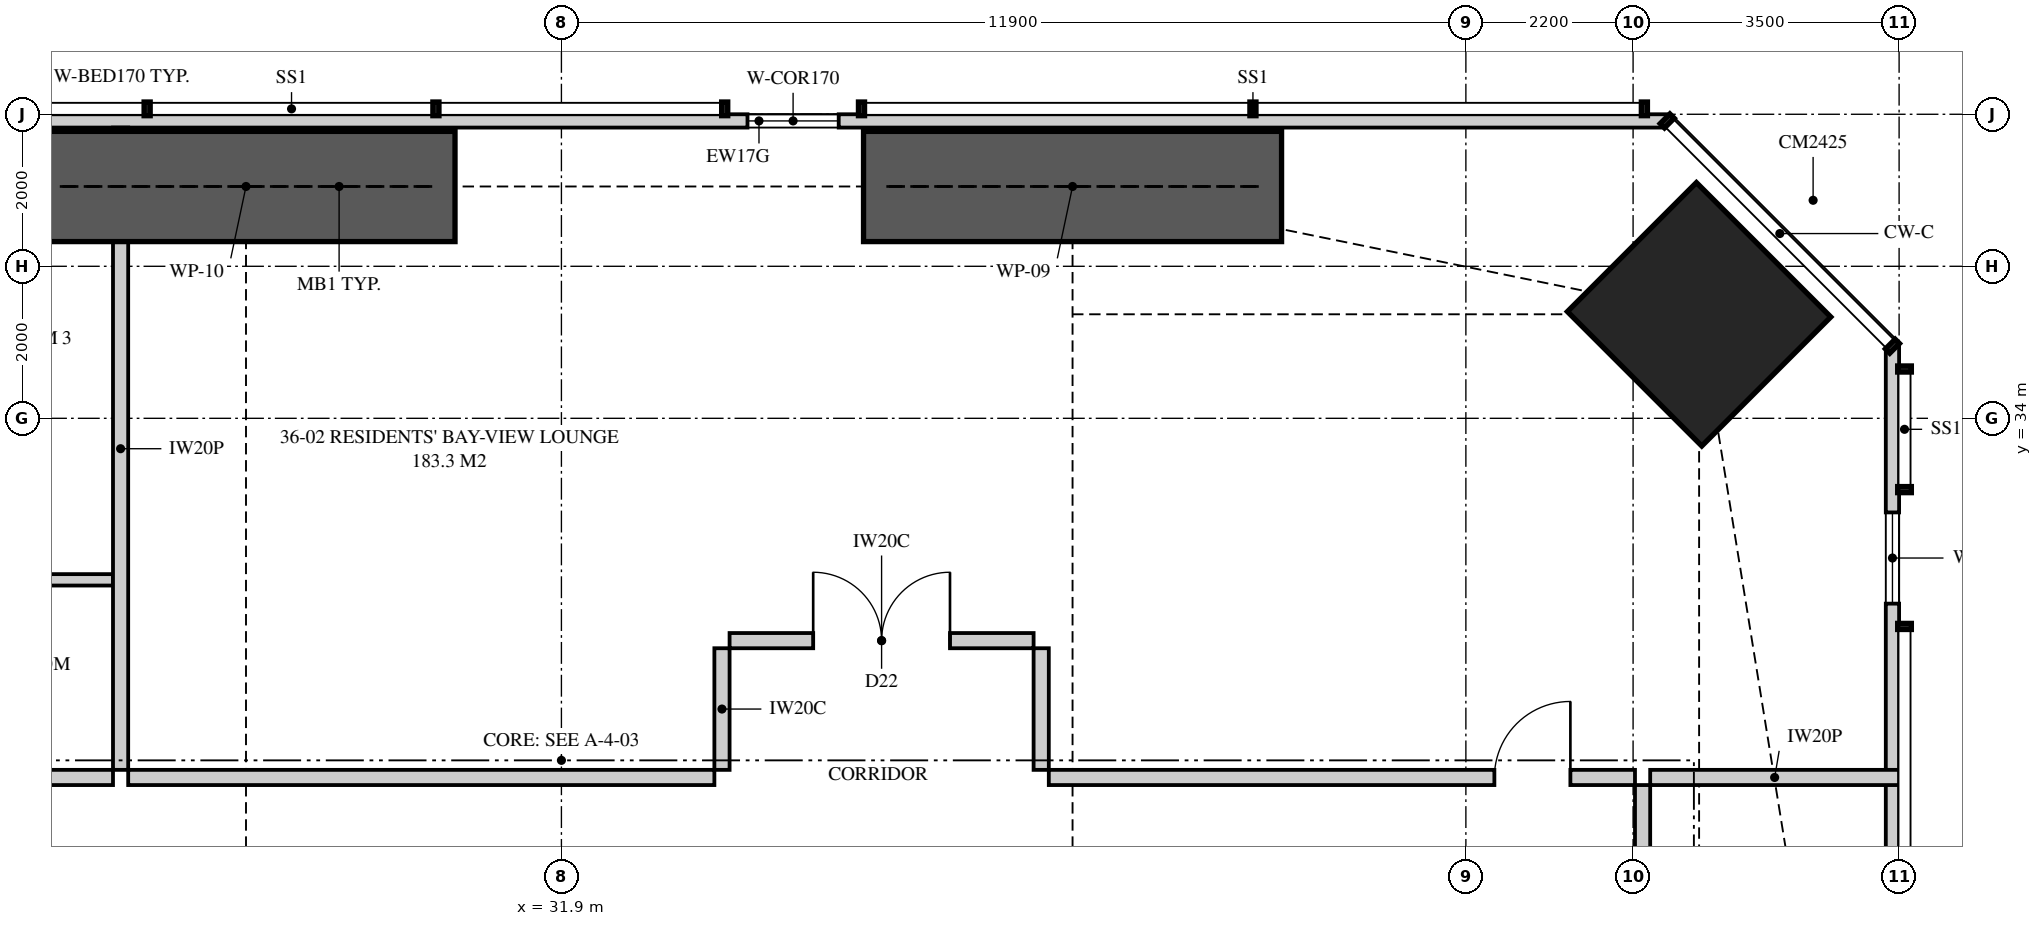
"""IFC4 building model, lengths in metres.
Left out: names, types, materials, properties, quantities, classifications, styles, units other than length and angle.
Written with IfcOpenShell. Run it as: python <this file> out.ifc"""

import sys

from ifc_helpers import new_model, si_unit, direction, frame, frame_2d, origin, origin_2d, place, context, subcontext, project, spatial, polyline, rectangle, outline, extrude, element, fill, save


model = new_model("IFC4")
c1 = context("Model", 3, precision=1e-05, world=origin(), true_north=direction((0.0, 1.0)))
c2 = subcontext(c1, "Body", "Model", "MODEL_VIEW")
j1 = project(units=[si_unit("LENGTHUNIT", "METRE"), si_unit("PLANEANGLEUNIT", "RADIAN")], contexts=[c1])
p1 = place(None, origin())
s1 = spatial("IfcSite", under=j1, at=p1, CompositionType="ELEMENT")
p2 = place(p1, origin())
s2 = spatial("IfcBuilding", under=s1, at=p2, CompositionType="ELEMENT")
p3 = place(p2, frame((0.0, 0.0, 131.65)))
s3 = spatial("IfcBuildingStorey", under=s2, at=p3, CompositionType="ELEMENT", Elevation=131.65)
p4 = place(p3, frame((46.869, 35.369, 0.0), z_axis=(0.0, 0.0, 1.0), x_axis=(-0.707106781187, -0.707106781187, 0.0)))
e1 = element("IfcColumn", 1, at=p4, inside=s3, PredefinedType="COLUMN", context=c2, shape_type="SweptSolid", body=[
    extrude(rectangle(XDim=2.4, YDim=2.5, at=origin_2d()), origin(), (0.0, 0.0, 1.0), 3.35),
])
p5 = place(p3, frame((49.413, 3.051, 0.0), z_axis=(0.0, 0.0, 1.0), x_axis=(0.0, 1.0, 0.0)))
e2 = element("IfcWall", 2, at=p5, inside=s3, PredefinedType="SOLIDWALL", context=c2, shape_type="SweptSolid", body=[
    extrude(outline(polyline([(0.0, 0.0), (31.897, 0.0), (31.897, 3.11), (22.167, 3.11), (22.167, 2.15), (22.074, 2.15), (22.074, 3.11), (21.949, 3.11), (21.949, 2.15), (9.949, 2.15), (9.949, 3.11), (9.823, 3.11), (9.823, 2.15), (9.73, 2.15), (9.73, 3.11), (0.0, 3.11), (0.0, 0.0)])), frame((0.0, 0.087, 0.0), z_axis=(0.0, -1.0, 0.0), x_axis=(1.0, 0.0, 0.0)), (0.0, 0.0, 1.0), 0.175),
])
p6 = place(p5, frame((2.118, 0.0, 0.4)))
e3 = element("IfcOpeningElement", 3, at=p6, cuts=e2, PredefinedType="OPENING", context=c2, shape_type="SweptSolid", body=[
    extrude(rectangle(XDim=1.8, YDim=1.7, at=frame_2d((0.9, 0.85))), frame((0.0, 0.097, 0.0), z_axis=(0.0, -1.0, 0.0), x_axis=(1.0, 0.0, 0.0)), (0.0, 0.0, 1.0), 0.195),
])
p7 = place(p5, frame((14.849, 0.0, 0.4)))
e4 = element("IfcOpeningElement", 4, at=p7, cuts=e2, PredefinedType="OPENING", context=c2, shape_type="SweptSolid", body=[
    extrude(rectangle(XDim=1.2, YDim=1.7, at=frame_2d((0.6, 0.85))), frame((0.0, 0.097, 0.0), z_axis=(0.0, -1.0, 0.0), x_axis=(1.0, 0.0, 0.0)), (0.0, 0.0, 1.0), 0.195),
])
p8 = place(p5, frame((28.51, 0.0, 0.4)))
e5 = element("IfcOpeningElement", 5, at=p8, cuts=e2, PredefinedType="OPENING", context=c2, shape_type="SweptSolid", body=[
    extrude(rectangle(XDim=1.2, YDim=1.7, at=frame_2d((0.6, 0.85))), frame((0.0, 0.097, 0.0), z_axis=(0.0, -1.0, 0.0), x_axis=(1.0, 0.0, 0.0)), (0.0, 0.0, 1.0), 0.195),
])
p9 = place(p3, frame((46.449, 37.913, 0.0), z_axis=(0.0, 0.0, 1.0), x_axis=(-1.0, 0.0, 0.0)))
e6 = element("IfcWall", 6, at=p9, inside=s3, PredefinedType="SOLIDWALL", context=c2, shape_type="SweptSolid", body=[
    extrude(outline(polyline([(0.0, 0.0), (23.899, 0.0), (23.899, 2.15), (7.824, 2.15), (7.824, 3.11), (7.666, 3.11), (7.666, 2.15), (7.62, 2.15), (7.62, 3.11), (0.0, 3.11), (0.0, 0.0)])), frame((0.0, 0.087, 0.0), z_axis=(0.0, -1.0, 0.0), x_axis=(1.0, 0.0, 0.0)), (0.0, 0.0, 1.0), 0.175),
])
p10 = place(p9, frame((10.9, 0.0, 0.4)))
e7 = element("IfcOpeningElement", 7, at=p10, cuts=e6, PredefinedType="OPENING", context=c2, shape_type="SweptSolid", body=[
    extrude(rectangle(XDim=1.2, YDim=1.7, at=frame_2d((0.6, 0.85))), frame((0.0, 0.097, 0.0), z_axis=(0.0, -1.0, 0.0), x_axis=(1.0, 0.0, 0.0)), (0.0, 0.0, 1.0), 0.195),
])
p11 = place(p9, frame((21.559, 0.0, 0.4)))
e8 = element("IfcOpeningElement", 8, at=p11, cuts=e6, PredefinedType="OPENING", context=c2, shape_type="SweptSolid", body=[
    extrude(rectangle(XDim=1.8, YDim=1.7, at=frame_2d((0.9, 0.85))), frame((0.0, 0.097, 0.0), z_axis=(0.0, -1.0, 0.0), x_axis=(1.0, 0.0, 0.0)), (0.0, 0.0, 1.0), 0.195),
])
p12 = place(p3, frame((26.1, 37.825, 0.0), z_axis=(0.0, 0.0, 1.0), x_axis=(0.0, -1.0, 0.0)))
e9 = element("IfcWall", 9, at=p12, inside=s3, PredefinedType="PARTITIONING", context=c2, shape_type="SweptSolid", body=[
    extrude(outline(polyline([(0.529, 2.15), (0.0, 2.15), (0.0, 0.0), (0.529, 0.0), (0.529, 0.376), (1.021, 0.376), (1.021, 0.0), (8.45, 0.0), (8.45, 3.11), (1.685, 3.11), (1.685, 2.15), (1.021, 2.15), (1.021, 1.774), (0.529, 1.774), (0.529, 2.15)])), frame((0.0, 0.1, 0.0), z_axis=(0.0, -1.0, 0.0), x_axis=(1.0, 0.0, 0.0)), (0.0, 0.0, 1.0), 0.2),
])
p13 = place(p3, frame((17.775, 29.275, 0.0), z_axis=(0.0, 0.0, 1.0), x_axis=(1.0, 0.0, 0.0)))
e10 = element("IfcWall", 10, at=p13, inside=s3, PredefinedType="PARTITIONING", context=c2, shape_type="SweptSolid", body=[
    extrude(rectangle(XDim=8.225, YDim=0.2, at=frame_2d((4.113, 0.0))), origin(), (0.0, 0.0, 1.0), 3.11),
])
p14 = place(p13, frame((0.2, 0.0, 0.0)))
e11 = element("IfcOpeningElement", 11, at=p14, cuts=e10, PredefinedType="OPENING", context=c2, shape_type="SweptSolid", body=[
    extrude(rectangle(XDim=1.05, YDim=2.2, at=frame_2d((0.525, 1.1))), frame((0.0, 0.11, 0.0), z_axis=(0.0, -1.0, 0.0), x_axis=(1.0, 0.0, 0.0)), (0.0, 0.0, 1.0), 0.22),
])
p15 = place(p3, frame((22.65, 31.875, 0.0), z_axis=(0.0, 0.0, 1.0), x_axis=(1.0, 0.0, 0.0)))
e12 = element("IfcWall", 12, at=p15, inside=s3, PredefinedType="PLUMBINGWALL", context=c2, shape_type="SweptSolid", body=[
    extrude(rectangle(XDim=3.35, YDim=0.15, at=frame_2d((1.675, 0.0))), origin(), (0.0, 0.0, 1.0), 3.11),
])
p16 = place(p3, frame((26.2, 29.275, 0.0), z_axis=(0.0, 0.0, 1.0), x_axis=(1.0, 0.0, 0.0)))
e13 = element("IfcWall", 13, at=p16, inside=s3, PredefinedType="PARTITIONING", context=c2, shape_type="SweptSolid", body=[
    extrude(outline(polyline([(0.0, 0.0), (7.713, 0.0), (7.712, 3.11), (1.887, 3.11), (1.887, 2.541), (1.213, 2.541), (1.213, 3.11), (0.0, 3.11), (0.0, 0.0)])), frame((0.0, 0.1, 0.0), z_axis=(0.0, -1.0, 0.0), x_axis=(1.0, 0.0, 0.0)), (0.0, 0.0, 1.0), 0.2),
])
p17 = place(p3, frame((46.225, 29.275, 0.0), z_axis=(0.0, 0.0, 1.0), x_axis=(1.0, 0.0, 0.0)))
e14 = element("IfcWall", 14, at=p17, inside=s3, PredefinedType="PARTITIONING", context=c2, shape_type="SweptSolid", body=[
    extrude(outline(polyline([(0.0, 0.0), (3.275, 0.0), (3.275, 3.11), (2.554, 3.11), (2.554, 2.15), (0.805, 2.15), (0.805, 2.541), (0.306, 2.541), (0.306, 3.11), (0.0, 3.11), (0.0, 0.0)])), frame((0.0, 0.1, 0.0), z_axis=(0.0, -1.0, 0.0), x_axis=(1.0, 0.0, 0.0)), (0.0, 0.0, 1.0), 0.2),
])
p18 = place(p3, frame((46.125, 7.825, 0.0), z_axis=(0.0, 0.0, 1.0), x_axis=(0.0, 1.0, 0.0)))
e15 = element("IfcWall", 15, at=p18, inside=s3, PredefinedType="PARTITIONING", context=c2, shape_type="SweptSolid", body=[
    extrude(outline(polyline([(0.0, 0.0), (21.35, 0.0), (21.35, 3.11), (17.512, 3.11), (17.512, 2.541), (16.838, 2.541), (16.838, 3.11), (5.512, 3.11), (5.512, 2.541), (4.838, 2.541), (4.838, 3.11), (0.0, 3.11), (0.0, 0.0)])), frame((0.0, 0.1, 0.0), z_axis=(0.0, -1.0, 0.0), x_axis=(1.0, 0.0, 0.0)), (0.0, 0.0, 1.0), 0.2),
])
p19 = place(p18, frame((9.775, 0.0, 0.0)))
e16 = element("IfcOpeningElement", 16, at=p19, cuts=e15, PredefinedType="OPENING", context=c2, shape_type="SweptSolid", body=[
    extrude(rectangle(XDim=1.8, YDim=2.1, at=frame_2d((0.9, 1.05))), frame((0.0, 0.11, 0.0), z_axis=(0.0, -1.0, 0.0), x_axis=(1.0, 0.0, 0.0)), (0.0, 0.0, 1.0), 0.22),
])
p20 = place(p18, frame((19.5, 0.0, 0.0)))
e17 = element("IfcOpeningElement", 17, at=p20, cuts=e15, PredefinedType="OPENING", context=c2, shape_type="SweptSolid", body=[
    extrude(rectangle(XDim=1.0, YDim=2.1, at=frame_2d((0.5, 1.05))), frame((0.0, 0.11, 0.0), z_axis=(0.0, -1.0, 0.0), x_axis=(1.0, 0.0, 0.0)), (0.0, 0.0, 1.0), 0.22),
])
p21 = place(p3, frame((38.312, 29.275, 0.0), z_axis=(0.0, 0.0, 1.0), x_axis=(1.0, 0.0, 0.0)))
e18 = element("IfcWall", 18, at=p21, inside=s3, PredefinedType="PARTITIONING", context=c2, shape_type="SweptSolid", body=[
    extrude(outline(polyline([(0.0, 0.0), (7.712, 0.0), (7.712, 3.11), (0.65, 3.11), (0.65, 2.541), (0.0, 2.541), (0.0, 3.11), (0.0, 0.0)])), frame((0.0, 0.1, 0.0), z_axis=(0.0, -1.0, 0.0), x_axis=(1.0, 0.0, 0.0)), (0.0, 0.0, 1.0), 0.2),
])
p22 = place(p21, frame((5.863, 0.0, 0.0)))
e19 = element("IfcOpeningElement", 19, at=p22, cuts=e18, PredefinedType="OPENING", context=c2, shape_type="SweptSolid", body=[
    extrude(rectangle(XDim=1.0, YDim=2.1, at=frame_2d((0.5, 1.05))), frame((0.0, 0.11, 0.0), z_axis=(0.0, -1.0, 0.0), x_axis=(1.0, 0.0, 0.0)), (0.0, 0.0, 1.0), 0.22),
])
p23 = place(p3, frame((34.113, 31.075, 0.0), z_axis=(0.0, 0.0, 1.0), x_axis=(1.0, 0.0, 0.0)))
e20 = element("IfcWall", 20, at=p23, inside=s3, PredefinedType="PARTITIONING", context=c2, shape_type="SweptSolid", body=[
    extrude(rectangle(XDim=4.0, YDim=0.2, at=frame_2d((2.0, 0.0))), origin(), (0.0, 0.0, 1.0), 3.11),
])
p24 = place(p23, frame((1.1, 0.0, 0.0)))
e21 = element("IfcOpeningElement", 21, at=p24, cuts=e20, PredefinedType="OPENING", context=c2, shape_type="SweptSolid", body=[
    extrude(rectangle(XDim=1.8, YDim=2.1, at=frame_2d((0.9, 1.05))), frame((0.0, 0.11, 0.0), z_axis=(0.0, -1.0, 0.0), x_axis=(1.0, 0.0, 0.0)), (0.0, 0.0, 1.0), 0.22),
])
for number, where, z_axis, x_axis in (
    (22, (34.012, 29.375, 0.0), (0.0, 0.0, 1.0), (0.0, 1.0, 0.0)),
    (23, (38.212, 29.375, 0.0), (0.0, 0.0, 1.0), (0.0, 1.0, 0.0)),
):
    element("IfcWall", number, at=place(p3, frame(where, z_axis=z_axis, x_axis=x_axis)), inside=s3, PredefinedType="PARTITIONING", context=c2, shape_type="SweptSolid", body=[
        extrude(rectangle(XDim=1.6, YDim=0.2, at=frame_2d((0.8, 0.0))), origin(), (0.0, 0.0, 1.0), 3.11),
    ])
for number, where, z_axis, x_axis in (
    (24, (35.875, 37.05, 0.0), (0.0, 0.0, 1.0), (1.0, 0.0, 0.0)),
    (25, (25.0, 37.05, 0.0), (0.0, 0.0, 1.0), (1.0, 0.0, 0.0)),
):
    element("IfcWall", number, at=place(p3, frame(where, z_axis=z_axis, x_axis=x_axis)), inside=s3, PredefinedType="SHEAR", context=c2, shape_type="SweptSolid", body=[
        extrude(rectangle(XDim=5.5, YDim=1.45, at=frame_2d((2.75, 0.0))), origin(), (0.0, 0.0, 1.0), 3.35),
    ])
p25 = place(p8, origin())
e26 = element("IfcWindow", 26, at=p25, inside=s3, PartitioningType="SINGLE_PANEL", PredefinedType="WINDOW", context=c2, shape_type="SweptSolid", body=[
    extrude(rectangle(XDim=1.2, YDim=1.7, at=frame_2d((0.6, 0.85))), frame((0.0, 0.03, 0.0), z_axis=(0.0, -1.0, 0.0), x_axis=(1.0, 0.0, 0.0)), (0.0, 0.0, 1.0), 0.06),
])
fill(e5, e26)
p26 = place(p10, origin())
e27 = element("IfcWindow", 27, at=p26, inside=s3, PartitioningType="SINGLE_PANEL", PredefinedType="WINDOW", context=c2, shape_type="SweptSolid", body=[
    extrude(rectangle(XDim=1.2, YDim=1.7, at=frame_2d((0.6, 0.85))), frame((0.0, 0.03, 0.0), z_axis=(0.0, -1.0, 0.0), x_axis=(1.0, 0.0, 0.0)), (0.0, 0.0, 1.0), 0.06),
])
fill(e7, e27)
p27 = place(p24, origin())
e28 = element("IfcDoor", 28, at=p27, inside=s3, OperationType="DOUBLE_DOOR_SINGLE_SWING", PredefinedType="DOOR", context=c2, shape_type="SweptSolid", body=[
    extrude(rectangle(XDim=1.8, YDim=2.1, at=frame_2d((0.9, 1.05))), frame((0.0, 0.025, 0.0), z_axis=(0.0, -1.0, 0.0), x_axis=(1.0, 0.0, 0.0)), (0.0, 0.0, 1.0), 0.05),
])
fill(e21, e28)
p28 = place(p22, origin())
e29 = element("IfcDoor", 29, at=p28, inside=s3, OperationType="SINGLE_SWING_RIGHT", PredefinedType="DOOR", context=c2, shape_type="SweptSolid", body=[
    extrude(rectangle(XDim=1.0, YDim=2.1, at=frame_2d((0.5, 1.05))), frame((0.0, 0.025, 0.0), z_axis=(0.0, -1.0, 0.0), x_axis=(1.0, 0.0, 0.0)), (0.0, 0.0, 1.0), 0.05),
])
fill(e19, e29)
save(model, sys.argv[1])
